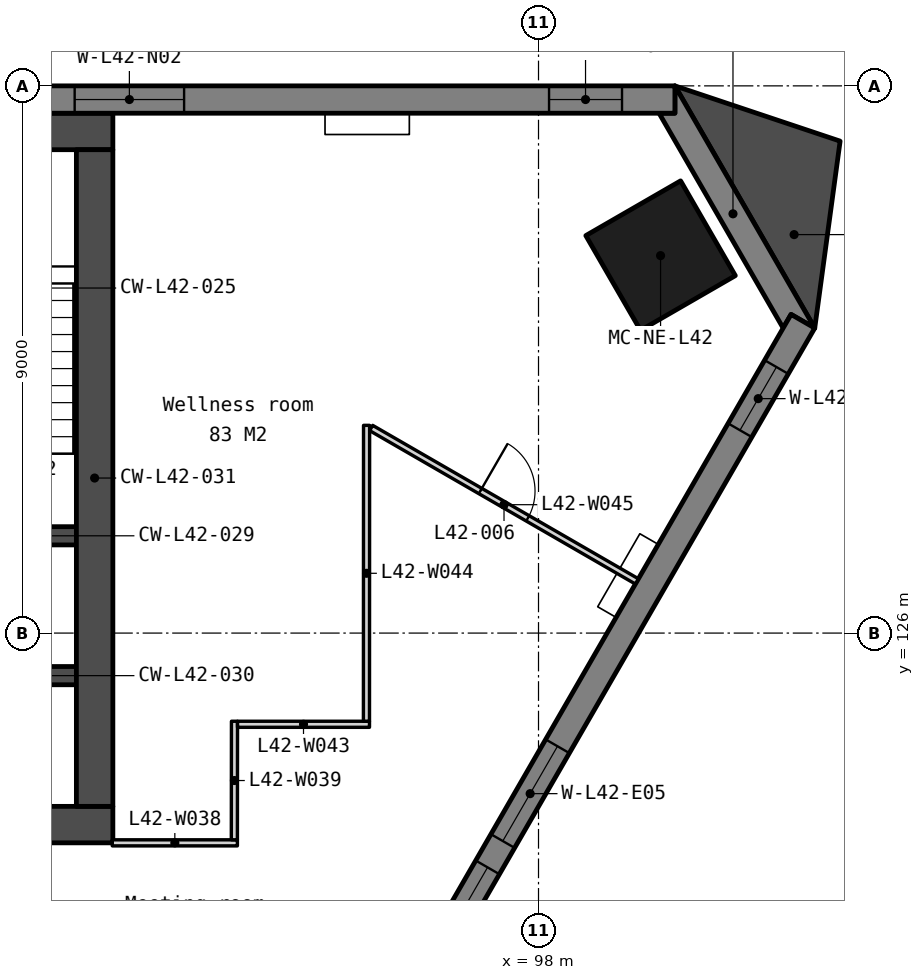
"""IFC4 building model, lengths in metres.
Left out: names, types, materials, properties, quantities, classifications, styles, units other than length and angle.
Written with IfcOpenShell. Run it as: python <this file> out.ifc"""

import sys

from ifc_helpers import new_model, si_unit, direction, frame, frame_2d, origin, origin_2d, place, context, subcontext, project, spatial, polyline, rectangle, outline, extrude, element, fill, save


model = new_model("IFC4")
c1 = context("Model", 3, precision=1e-05, world=origin(), true_north=direction((0.0, 1.0)))
c2 = subcontext(c1, "Body", "Model", "MODEL_VIEW")
j1 = project(units=[si_unit("LENGTHUNIT", "METRE"), si_unit("PLANEANGLEUNIT", "RADIAN")], contexts=[c1])
p1 = place(None, origin())
s1 = spatial("IfcSite", under=j1, at=p1, CompositionType="ELEMENT")
p2 = place(p1, origin())
s2 = spatial("IfcBuilding", under=s1, at=p2, CompositionType="ELEMENT")
p3 = place(p2, frame((0.0, 0.0, 167.6)))
s3 = spatial("IfcBuildingStorey", under=s2, at=p3, CompositionType="ELEMENT", Elevation=167.6)
p4 = place(p3, frame((100.007, 132.208, 0.0), z_axis=(0.0, 0.0, 1.0), x_axis=(-0.5, 0.866025403784, 0.0)))
e1 = element("IfcColumn", 1, at=p4, inside=s3, PredefinedType="COLUMN", context=c2, shape_type="SweptSolid", body=[
    extrude(rectangle(XDim=1.8, YDim=1.8, at=origin_2d()), origin(), (0.0, 0.0, 1.0), 3.9),
])
p5 = place(p3, frame((69.0, 134.25, 0.0), z_axis=(0.0, 0.0, 1.0), x_axis=(1.0, 0.0, 0.0)))
e2 = element("IfcWall", 2, at=p5, inside=s3, PredefinedType="SOLIDWALL", context=c2, shape_type="SweptSolid", body=[
    extrude(rectangle(XDim=22.0, YDim=0.6, at=frame_2d((11.0, 0.0))), origin(), (0.0, 0.0, 1.0), 3.75),
])
p6 = place(p3, frame((69.0, 122.85, 0.0), z_axis=(0.0, 0.0, 1.0), x_axis=(1.0, 0.0, 0.0)))
e3 = element("IfcWall", 3, at=p6, inside=s3, PredefinedType="SOLIDWALL", context=c2, shape_type="SweptSolid", body=[
    extrude(rectangle(XDim=22.0, YDim=0.6, at=frame_2d((11.0, 0.0))), origin(), (0.0, 0.0, 1.0), 3.75),
])
p7 = place(p6, frame((16.375, 0.0, 0.0)))
e4 = element("IfcOpeningElement", 4, at=p7, cuts=e3, PredefinedType="OPENING", context=c2, shape_type="SweptSolid", body=[
    extrude(rectangle(XDim=1.8, YDim=2.1, at=frame_2d((0.9, 1.05))), frame((0.0, 0.31, 0.0), z_axis=(0.0, -1.0, 0.0), x_axis=(1.0, 0.0, 0.0)), (0.0, 0.0, 1.0), 0.62),
])
p8 = place(p6, frame((3.825, 0.0, 0.0)))
e5 = element("IfcOpeningElement", 5, at=p8, cuts=e3, PredefinedType="OPENING", context=c2, shape_type="SweptSolid", body=[
    extrude(rectangle(XDim=1.8, YDim=2.1, at=frame_2d((0.9, 1.05))), frame((0.0, 0.31, 0.0), z_axis=(0.0, -1.0, 0.0), x_axis=(1.0, 0.0, 0.0)), (0.0, 0.0, 1.0), 0.62),
])
p9 = place(p6, frame((12.85, 0.0, 0.0)))
e6 = element("IfcOpeningElement", 6, at=p9, cuts=e3, PredefinedType="OPENING", context=c2, shape_type="SweptSolid", body=[
    extrude(rectangle(XDim=1.5, YDim=2.1, at=frame_2d((0.75, 1.05))), frame((0.0, 0.31, 0.0), z_axis=(0.0, -1.0, 0.0), x_axis=(1.0, 0.0, 0.0)), (0.0, 0.0, 1.0), 0.62),
])
for number, where, z_axis, x_axis in (
    (7, (87.85, 127.6, 0.0), (0.0, 0.0, 1.0), (1.0, 0.0, 0.0)),
    (8, (87.85, 125.3, 0.0), (0.0, 0.0, 1.0), (1.0, 0.0, 0.0)),
):
    element("IfcWall", number, at=place(p3, frame(where, z_axis=z_axis, x_axis=x_axis)), inside=s3, PredefinedType="SOLIDWALL", context=c2, shape_type="SweptSolid", body=[
        extrude(rectangle(XDim=2.55, YDim=0.3, at=frame_2d((1.275, 0.0))), origin(), (0.0, 0.0, 1.0), 3.75),
    ])
p10 = place(p3, frame((90.7, 133.95, 0.0), z_axis=(0.0, 0.0, 1.0), x_axis=(0.0, -1.0, 0.0)))
e9 = element("IfcWall", 9, at=p10, inside=s3, PredefinedType="SOLIDWALL", context=c2, shape_type="SweptSolid", body=[
    extrude(rectangle(XDim=10.8, YDim=0.6, at=frame_2d((5.4, 0.0))), origin(), (0.0, 0.0, 1.0), 3.75),
])
p11 = place(p3, frame((0.0, 0.0, -0.15)))
e10 = element("IfcWall", 10, at=p11, inside=s3, PredefinedType="SOLIDWALL", context=c2, shape_type="SweptSolid", body=[
    extrude(outline(polyline([(102.543, 131.016), (102.153, 131.241), (102.023, 131.016), (99.983, 134.55), (100.243, 134.55), (100.243, 135.0), (102.543, 131.016)])), origin(), (0.0, 0.0, 1.0), 3.9),
])
p12 = place(p3, frame((100.243, 134.775, -0.15), z_axis=(0.0, 0.0, 1.0), x_axis=(-1.0, 0.0, 0.0)))
e11 = element("IfcWall", 11, at=p12, inside=s3, PredefinedType="SOLIDWALL", context=c2, shape_type="SweptSolid", body=[
    extrude(outline(polyline([(40.486, 0.0), (40.486, 3.9), (0.0, 3.9), (0.0, 0.0), (40.486, 0.0)])), frame((0.0, 0.225, 0.0), z_axis=(0.0, -1.0, 0.0), x_axis=(1.0, 0.0, 0.0)), (0.0, 0.0, 1.0), 0.45),
])
p13 = place(p12, frame((0.87, 0.0, 0.95)))
e12 = element("IfcOpeningElement", 12, at=p13, cuts=e11, PredefinedType="OPENING", context=c2, shape_type="SweptSolid", body=[
    extrude(rectangle(XDim=1.2, YDim=2.2, at=frame_2d((0.6, 1.1))), frame((0.0, 0.235, 0.0), z_axis=(0.0, -1.0, 0.0), x_axis=(1.0, 0.0, 0.0)), (0.0, 0.0, 1.0), 0.47),
])
p14 = place(p12, frame((8.072, 0.0, 0.95)))
e13 = element("IfcOpeningElement", 13, at=p14, cuts=e11, PredefinedType="OPENING", context=c2, shape_type="SweptSolid", body=[
    extrude(rectangle(XDim=1.8, YDim=2.2, at=frame_2d((0.9, 1.1))), frame((0.0, 0.235, 0.0), z_axis=(0.0, -1.0, 0.0), x_axis=(1.0, 0.0, 0.0)), (0.0, 0.0, 1.0), 0.47),
])
p15 = place(p12, frame((10.372, 0.0, 0.95)))
e14 = element("IfcOpeningElement", 14, at=p15, cuts=e11, PredefinedType="OPENING", context=c2, shape_type="SweptSolid", body=[
    extrude(rectangle(XDim=1.8, YDim=2.2, at=frame_2d((0.9, 1.1))), frame((0.0, 0.235, 0.0), z_axis=(0.0, -1.0, 0.0), x_axis=(1.0, 0.0, 0.0)), (0.0, 0.0, 1.0), 0.47),
])
p16 = place(p12, frame((18.193, 0.0, 0.95)))
e15 = element("IfcOpeningElement", 15, at=p16, cuts=e11, PredefinedType="OPENING", context=c2, shape_type="SweptSolid", body=[
    extrude(rectangle(XDim=1.8, YDim=2.2, at=frame_2d((0.9, 1.1))), frame((0.0, 0.235, 0.0), z_axis=(0.0, -1.0, 0.0), x_axis=(1.0, 0.0, 0.0)), (0.0, 0.0, 1.0), 0.47),
])
p17 = place(p12, frame((20.493, 0.0, 0.95)))
e16 = element("IfcOpeningElement", 16, at=p17, cuts=e11, PredefinedType="OPENING", context=c2, shape_type="SweptSolid", body=[
    extrude(rectangle(XDim=1.8, YDim=2.2, at=frame_2d((0.9, 1.1))), frame((0.0, 0.235, 0.0), z_axis=(0.0, -1.0, 0.0), x_axis=(1.0, 0.0, 0.0)), (0.0, 0.0, 1.0), 0.47),
])
p18 = place(p12, frame((28.315, 0.0, 0.95)))
e17 = element("IfcOpeningElement", 17, at=p18, cuts=e11, PredefinedType="OPENING", context=c2, shape_type="SweptSolid", body=[
    extrude(rectangle(XDim=1.8, YDim=2.2, at=frame_2d((0.9, 1.1))), frame((0.0, 0.235, 0.0), z_axis=(0.0, -1.0, 0.0), x_axis=(1.0, 0.0, 0.0)), (0.0, 0.0, 1.0), 0.47),
])
p19 = place(p12, frame((30.615, 0.0, 0.95)))
e18 = element("IfcOpeningElement", 18, at=p19, cuts=e11, PredefinedType="OPENING", context=c2, shape_type="SweptSolid", body=[
    extrude(rectangle(XDim=1.8, YDim=2.2, at=frame_2d((0.9, 1.1))), frame((0.0, 0.235, 0.0), z_axis=(0.0, -1.0, 0.0), x_axis=(1.0, 0.0, 0.0)), (0.0, 0.0, 1.0), 0.47),
])
p20 = place(p12, frame((38.417, 0.0, 0.95)))
e19 = element("IfcOpeningElement", 19, at=p20, cuts=e11, PredefinedType="OPENING", context=c2, shape_type="SweptSolid", body=[
    extrude(rectangle(XDim=1.2, YDim=2.2, at=frame_2d((0.6, 1.1))), frame((0.0, 0.235, 0.0), z_axis=(0.0, -1.0, 0.0), x_axis=(1.0, 0.0, 0.0)), (0.0, 0.0, 1.0), 0.47),
])
p21 = place(p3, frame((88.166, 106.564, -0.15), z_axis=(0.0, 0.0, 1.0), x_axis=(0.499995644604, 0.866027918359, 0.0)))
e20 = element("IfcWall", 20, at=p21, inside=s3, PredefinedType="SOLIDWALL", context=c2, shape_type="SweptSolid", body=[
    extrude(outline(polyline([(28.365, 3.9), (28.365, 0.0), (0.0, 0.0), (0.0, 3.9), (28.365, 3.9)])), frame((0.0, 0.225, 0.0), z_axis=(0.0, -1.0, 0.0), x_axis=(1.0, 0.0, 0.0)), (0.0, 0.0, 1.0), 0.45),
])
p22 = place(p21, frame((6.072, 0.0, 0.95)))
e21 = element("IfcOpeningElement", 21, at=p22, cuts=e20, PredefinedType="OPENING", context=c2, shape_type="SweptSolid", body=[
    extrude(rectangle(XDim=1.8, YDim=2.2, at=frame_2d((0.9, 1.1))), frame((0.0, 0.235, 0.0), z_axis=(0.0, -1.0, 0.0), x_axis=(1.0, 0.0, 0.0)), (0.0, 0.0, 1.0), 0.47),
])
p23 = place(p21, frame((8.372, 0.0, 0.95)))
e22 = element("IfcOpeningElement", 22, at=p23, cuts=e20, PredefinedType="OPENING", context=c2, shape_type="SweptSolid", body=[
    extrude(rectangle(XDim=1.8, YDim=2.2, at=frame_2d((0.9, 1.1))), frame((0.0, 0.235, 0.0), z_axis=(0.0, -1.0, 0.0), x_axis=(1.0, 0.0, 0.0)), (0.0, 0.0, 1.0), 0.47),
])
p24 = place(p21, frame((16.193, 0.0, 0.95)))
e23 = element("IfcOpeningElement", 23, at=p24, cuts=e20, PredefinedType="OPENING", context=c2, shape_type="SweptSolid", body=[
    extrude(rectangle(XDim=1.8, YDim=2.2, at=frame_2d((0.9, 1.1))), frame((0.0, 0.235, 0.0), z_axis=(0.0, -1.0, 0.0), x_axis=(1.0, 0.0, 0.0)), (0.0, 0.0, 1.0), 0.47),
])
p25 = place(p21, frame((18.493, 0.0, 0.95)))
e24 = element("IfcOpeningElement", 24, at=p25, cuts=e20, PredefinedType="OPENING", context=c2, shape_type="SweptSolid", body=[
    extrude(rectangle(XDim=1.8, YDim=2.2, at=frame_2d((0.9, 1.1))), frame((0.0, 0.235, 0.0), z_axis=(0.0, -1.0, 0.0), x_axis=(1.0, 0.0, 0.0)), (0.0, 0.0, 1.0), 0.47),
])
p26 = place(p21, frame((26.295, 0.0, 0.95)))
e25 = element("IfcOpeningElement", 25, at=p26, cuts=e20, PredefinedType="OPENING", context=c2, shape_type="SweptSolid", body=[
    extrude(rectangle(XDim=1.2, YDim=2.2, at=frame_2d((0.6, 1.1))), frame((0.0, 0.235, 0.0), z_axis=(0.0, -1.0, 0.0), x_axis=(1.0, 0.0, 0.0)), (0.0, 0.0, 1.0), 0.47),
])
p27 = place(p3, frame((0.0, 0.0, -0.15)))
e26 = element("IfcWall", 26, at=p27, inside=s3, PredefinedType="SOLIDWALL", context=c2, shape_type="SweptSolid", body=[
    extrude(outline(polyline([(102.543, 131.016), (102.96, 134.091), (100.243, 135.0), (102.543, 131.016)])), origin(), (0.0, 0.0, 1.0), 3.9),
])
p28 = place(p3, frame((90.99, 122.55, 0.0), z_axis=(0.0, 0.0, 1.0), x_axis=(1.0, 0.0, 0.0)))
e27 = element("IfcWall", 27, at=p28, inside=s3, PredefinedType="PARTITIONING", context=c2, shape_type="SweptSolid", body=[
    extrude(rectangle(XDim=2.058, YDim=0.1, at=frame_2d((1.029, 0.0))), origin(), (0.0, 0.0, 1.0), 3.75),
])
p29 = place(p3, frame((92.998, 122.6, 0.0), z_axis=(0.0, 0.0, 1.0), x_axis=(0.001001752565, 0.999999498246, 0.0)))
e28 = element("IfcWall", 28, at=p29, inside=s3, PredefinedType="PARTITIONING", context=c2, shape_type="SweptSolid", body=[
    extrude(rectangle(XDim=1.95, YDim=0.1, at=frame_2d((0.975, 0.0))), origin(), (0.0, 0.0, 1.0), 3.75),
])
p30 = place(p3, frame((93.05, 124.5, 0.0), z_axis=(0.0, 0.0, 1.0), x_axis=(1.0, 0.0, 0.0)))
e29 = element("IfcWall", 29, at=p30, inside=s3, PredefinedType="PARTITIONING", context=c2, shape_type="SweptSolid", body=[
    extrude(rectangle(XDim=2.17, YDim=0.1, at=frame_2d((1.085, 0.0))), origin(), (0.0, 0.0, 1.0), 3.75),
])
p31 = place(p3, frame((95.17, 124.55, 0.0), z_axis=(0.0, 0.0, 1.0), x_axis=(0.000401344472, 0.999999919461, 0.0)))
e30 = element("IfcWall", 30, at=p31, inside=s3, PredefinedType="PARTITIONING", context=c2, shape_type="SweptSolid", body=[
    extrude(rectangle(XDim=4.866, YDim=0.1, at=frame_2d((2.433, 0.0))), origin(), (0.0, 0.0, 1.0), 3.75),
])
p32 = place(p3, frame((95.247, 129.373, 0.0), z_axis=(0.0, 0.0, 1.0), x_axis=(0.866040580427, -0.499973712363, 0.0)))
e31 = element("IfcWall", 31, at=p32, inside=s3, PredefinedType="PARTITIONING", context=c2, shape_type="SweptSolid", body=[
    extrude(rectangle(XDim=5.047, YDim=0.1, at=frame_2d((2.523, 0.0))), origin(), (0.0, 0.0, 1.0), 3.75),
])
p33 = place(p32, frame((2.073, 0.0, 0.0)))
e32 = element("IfcOpeningElement", 32, at=p33, cuts=e31, PredefinedType="OPENING", context=c2, shape_type="SweptSolid", body=[
    extrude(rectangle(XDim=0.9, YDim=2.1, at=frame_2d((0.45, 1.05))), frame((0.0, 0.06, 0.0), z_axis=(0.0, -1.0, 0.0), x_axis=(1.0, 0.0, 0.0)), (0.0, 0.0, 1.0), 0.12),
])
p34 = place(p13, origin())
e33 = element("IfcWindow", 33, at=p34, inside=s3, PartitioningType="SINGLE_PANEL", PredefinedType="WINDOW", context=c2, shape_type="SweptSolid", body=[
    extrude(rectangle(XDim=1.2, YDim=2.2, at=frame_2d((0.6, 1.1))), frame((0.0, 0.03, 0.0), z_axis=(0.0, -1.0, 0.0), x_axis=(1.0, 0.0, 0.0)), (0.0, 0.0, 1.0), 0.06),
])
fill(e12, e33)
p35 = place(p14, origin())
e34 = element("IfcWindow", 34, at=p35, inside=s3, PartitioningType="SINGLE_PANEL", PredefinedType="WINDOW", context=c2, shape_type="SweptSolid", body=[
    extrude(rectangle(XDim=1.8, YDim=2.2, at=frame_2d((0.9, 1.1))), frame((0.0, 0.03, 0.0), z_axis=(0.0, -1.0, 0.0), x_axis=(1.0, 0.0, 0.0)), (0.0, 0.0, 1.0), 0.06),
])
fill(e13, e34)
p36 = place(p24, origin())
e35 = element("IfcWindow", 35, at=p36, inside=s3, PartitioningType="SINGLE_PANEL", PredefinedType="WINDOW", context=c2, shape_type="SweptSolid", body=[
    extrude(rectangle(XDim=1.8, YDim=2.2, at=frame_2d((0.9, 1.1))), frame((0.0, 0.03, 0.0), z_axis=(0.0, -1.0, 0.0), x_axis=(1.0, 0.0, 0.0)), (0.0, 0.0, 1.0), 0.06),
])
fill(e23, e35)
p37 = place(p25, origin())
e36 = element("IfcWindow", 36, at=p37, inside=s3, PartitioningType="SINGLE_PANEL", PredefinedType="WINDOW", context=c2, shape_type="SweptSolid", body=[
    extrude(rectangle(XDim=1.8, YDim=2.2, at=frame_2d((0.9, 1.1))), frame((0.0, 0.03, 0.0), z_axis=(0.0, -1.0, 0.0), x_axis=(1.0, 0.0, 0.0)), (0.0, 0.0, 1.0), 0.06),
])
fill(e24, e36)
p38 = place(p26, origin())
e37 = element("IfcWindow", 37, at=p38, inside=s3, PartitioningType="SINGLE_PANEL", PredefinedType="WINDOW", context=c2, shape_type="SweptSolid", body=[
    extrude(rectangle(XDim=1.2, YDim=2.2, at=frame_2d((0.6, 1.1))), frame((0.0, 0.03, 0.0), z_axis=(0.0, -1.0, 0.0), x_axis=(1.0, 0.0, 0.0)), (0.0, 0.0, 1.0), 0.06),
])
fill(e25, e37)
p39 = place(p33, origin())
e38 = element("IfcDoor", 38, at=p39, inside=s3, OperationType="SINGLE_SWING_LEFT", PredefinedType="DOOR", context=c2, shape_type="SweptSolid", body=[
    extrude(rectangle(XDim=0.9, YDim=2.1, at=frame_2d((0.45, 1.05))), frame((0.0, 0.025, 0.0), z_axis=(0.0, -1.0, 0.0), x_axis=(1.0, 0.0, 0.0)), (0.0, 0.0, 1.0), 0.05),
])
fill(e32, e38)
save(model, sys.argv[1])
